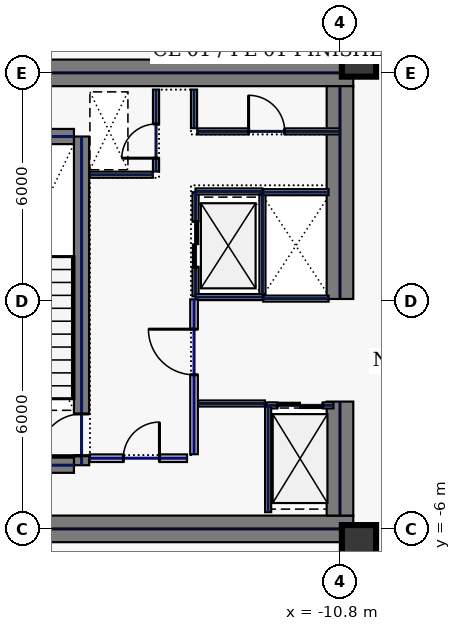
"""IFC4 building model, lengths in metres.
Left out: names, types, materials, properties, quantities, classifications, styles, units other than length and angle.
Written with IfcOpenShell. Run it as: python <this file> out.ifc"""

import sys

from ifc_helpers import new_model, si_unit, direction, frame, frame_2d, origin, origin_2d, place, context, subcontext, project, spatial, rectangle, hollow_rectangle, extrude, element, fill, save


model = new_model("IFC4")
c1 = context("Model", 3, precision=1e-05, world=origin(), true_north=direction((0.0, 1.0)))
c2 = subcontext(c1, "Body", "Model", "MODEL_VIEW")
j1 = project(units=[si_unit("LENGTHUNIT", "METRE"), si_unit("PLANEANGLEUNIT", "RADIAN")], contexts=[c1])
p1 = place(None, origin())
s1 = spatial("IfcSite", under=j1, at=p1, CompositionType="ELEMENT")
p2 = place(p1, origin())
s2 = spatial("IfcBuilding", under=s1, at=p2, CompositionType="ELEMENT")
p3 = place(p2, frame((0.0, 0.0, 184.2)))
s3 = spatial("IfcBuildingStorey", under=s2, at=p3, CompositionType="ELEMENT", Elevation=184.2)
for number, where, z_axis, x_axis in (
    (1, (-22.0, 6.0, 0.0), (0.0, 0.0, 1.0), (1.0, 0.0, 0.0)),
    (2, (-22.0, -6.0, 0.0), (0.0, 0.0, 1.0), (1.0, 0.0, 0.0)),
):
    element("IfcWall", number, at=place(p3, frame(where, z_axis=z_axis, x_axis=x_axis)), inside=s3, PredefinedType="SHEAR", context=c2, shape_type="SweptSolid", body=[
        extrude(rectangle(XDim=11.55, YDim=0.7, at=frame_2d((5.775, 0.0))), origin(), (0.0, 0.0, 1.0), 3.74),
    ])
p4 = place(p3, frame((-10.8, -5.65, 0.0), z_axis=(0.0, 0.0, 1.0), x_axis=(0.0, 1.0, 0.0)))
e3 = element("IfcWall", 3, at=p4, inside=s3, PredefinedType="SHEAR", context=c2, shape_type="SweptSolid", body=[
    extrude(rectangle(XDim=3.0, YDim=0.7, at=frame_2d((1.5, 0.0))), origin(), (0.0, 0.0, 1.0), 3.74),
])
p5 = place(p3, frame((-10.8, 0.05, 0.0), z_axis=(0.0, 0.0, 1.0), x_axis=(0.0, 1.0, 0.0)))
e4 = element("IfcWall", 4, at=p5, inside=s3, PredefinedType="SHEAR", context=c2, shape_type="SweptSolid", body=[
    extrude(rectangle(XDim=5.6, YDim=0.7, at=frame_2d((2.8, 0.0))), origin(), (0.0, 0.0, 1.0), 3.74),
])
p6 = place(p3, frame((-17.6, -4.325, 0.0), z_axis=(0.0, 0.0, 1.0), x_axis=(0.0, 1.0, 0.0)))
e5 = element("IfcWall", 5, at=p6, inside=s3, PredefinedType="SHEAR", context=c2, shape_type="SweptSolid", body=[
    extrude(rectangle(XDim=8.65, YDim=0.4, at=frame_2d((4.325, 0.0))), origin(), (0.0, 0.0, 1.0), 3.74),
])
p7 = place(p6, frame((0.25, 0.0, 0.0)))
e6 = element("IfcOpeningElement", 6, at=p7, cuts=e5, PredefinedType="OPENING", context=c2, shape_type="SweptSolid", body=[
    extrude(rectangle(XDim=1.1, YDim=2.2, at=frame_2d((0.55, 1.1))), frame((0.0, 0.21, 0.0), z_axis=(0.0, -1.0, 0.0), x_axis=(1.0, 0.0, 0.0)), (0.0, 0.0, 1.0), 0.42),
])
for number, where, z_axis, x_axis in (
    (7, (-21.2, -4.325, 0.0), (0.0, 0.0, 1.0), (1.0, 0.0, 0.0)),
    (8, (-21.2, 4.325, 0.0), (0.0, 0.0, 1.0), (1.0, 0.0, 0.0)),
):
    element("IfcWall", number, at=place(p3, frame(where, z_axis=z_axis, x_axis=x_axis)), inside=s3, PredefinedType="SHEAR", context=c2, shape_type="SweptSolid", body=[
        extrude(rectangle(XDim=3.4, YDim=0.4, at=frame_2d((1.7, 0.0))), origin(), (0.0, 0.0, 1.0), 3.74),
    ])
for number, where, z_axis, x_axis in (
    (9, (-10.3, -6.35, 0.0), (0.0, 0.0, 1.0), (1.0, 0.0, 0.0)),
    (10, (-10.3, 6.35, 0.0), (0.0, 0.0, 1.0), (1.0, 0.0, 0.0)),
):
    element("IfcColumn", number, at=place(p3, frame(where, z_axis=z_axis, x_axis=x_axis)), inside=s3, PredefinedType="COLUMN", context=c2, shape_type="SweptSolid", body=[
        extrude(hollow_rectangle(XDim=0.9, YDim=0.9, WallThickness=0.04, at=origin_2d()), origin(), (0.0, 0.0, 1.0), 3.74),
    ])
p8 = place(p3, frame((-14.6, 0.12, 0.0), z_axis=(0.0, 0.0, 1.0), x_axis=(0.0, 1.0, 0.0)))
e11 = element("IfcWall", 11, at=p8, inside=s3, PredefinedType="PARTITIONING", context=c2, shape_type="SweptSolid", body=[
    extrude(rectangle(XDim=2.74, YDim=0.16, at=frame_2d((1.37, 0.0))), origin(), (0.0, 0.0, 1.0), 3.74),
])
p9 = place(p8, frame((0.77, 0.0, 0.0)))
e12 = element("IfcOpeningElement", 12, at=p9, cuts=e11, PredefinedType="OPENING", context=c2, shape_type="SweptSolid", body=[
    extrude(rectangle(XDim=1.2, YDim=2.2, at=frame_2d((0.6, 1.1))), frame((0.0, 0.09, 0.0), z_axis=(0.0, -1.0, 0.0), x_axis=(1.0, 0.0, 0.0)), (0.0, 0.0, 1.0), 0.18),
])
for number, where, z_axis, x_axis in (
    (13, (-14.6, 0.1, 0.0), (0.0, 0.0, 1.0), (1.0, 0.0, 0.0)),
    (14, (-14.6, 2.88, 0.0), (0.0, 0.0, 1.0), (1.0, 0.0, 0.0)),
):
    element("IfcWall", number, at=place(p3, frame(where, z_axis=z_axis, x_axis=x_axis)), inside=s3, PredefinedType="PARTITIONING", context=c2, shape_type="SweptSolid", body=[
        extrude(rectangle(XDim=1.76, YDim=0.16, at=frame_2d((0.88, 0.0))), origin(), (0.0, 0.0, 1.0), 3.74),
    ])
p10 = place(p3, frame((-12.84, 0.18, 0.0), z_axis=(0.0, 0.0, 1.0), x_axis=(0.0, 1.0, 0.0)))
e15 = element("IfcWall", 15, at=p10, inside=s3, PredefinedType="PARTITIONING", context=c2, shape_type="SweptSolid", body=[
    extrude(rectangle(XDim=2.62, YDim=0.16, at=frame_2d((1.31, 0.0))), origin(), (0.0, 0.0, 1.0), 3.74),
])
p11 = place(p3, frame((-12.73, -2.75, 0.0), z_axis=(0.0, 0.0, 1.0), x_axis=(1.0, 0.0, 0.0)))
e16 = element("IfcWall", 16, at=p11, inside=s3, PredefinedType="PARTITIONING", context=c2, shape_type="SweptSolid", body=[
    extrude(rectangle(XDim=1.76, YDim=0.16, at=frame_2d((0.88, 0.0))), origin(), (0.0, 0.0, 1.0), 3.74),
])
p12 = place(p11, frame((0.28, 0.0, 0.0)))
e17 = element("IfcOpeningElement", 17, at=p12, cuts=e16, PredefinedType="OPENING", context=c2, shape_type="SweptSolid", body=[
    extrude(rectangle(XDim=1.2, YDim=2.2, at=frame_2d((0.6, 1.1))), frame((0.0, 0.09, 0.0), z_axis=(0.0, -1.0, 0.0), x_axis=(1.0, 0.0, 0.0)), (0.0, 0.0, 1.0), 0.18),
])
for number, where, z_axis, x_axis in (
    (18, (-12.82, 0.06, 0.0), (0.0, 0.0, 1.0), (1.0, 0.0, 0.0)),
    (19, (-12.82, 2.86, 0.0), (0.0, 0.0, 1.0), (1.0, 0.0, 0.0)),
):
    element("IfcWall", number, at=place(p3, frame(where, z_axis=z_axis, x_axis=x_axis)), inside=s3, PredefinedType="PARTITIONING", context=c2, shape_type="SweptSolid", body=[
        extrude(rectangle(XDim=1.72, YDim=0.16, at=frame_2d((0.86, 0.0))), origin(), (0.0, 0.0, 1.0), 3.74),
    ])
p13 = place(p3, frame((-15.64, 3.405, 0.0), z_axis=(0.0, 0.0, 1.0), x_axis=(0.0, 1.0, 0.0)))
e20 = element("IfcWall", 20, at=p13, inside=s3, PredefinedType="PARTITIONING", context=c2, shape_type="SweptSolid", body=[
    extrude(rectangle(XDim=2.155, YDim=0.16, at=frame_2d((1.078, 0.0))), origin(), (0.0, 0.0, 1.0), 3.74),
])
p14 = place(p13, frame((0.35, 0.0, 0.0)))
e21 = element("IfcOpeningElement", 21, at=p14, cuts=e20, PredefinedType="OPENING", context=c2, shape_type="SweptSolid", body=[
    extrude(rectangle(XDim=0.9, YDim=2.2, at=frame_2d((0.45, 1.1))), frame((0.0, 0.09, 0.0), z_axis=(0.0, -1.0, 0.0), x_axis=(1.0, 0.0, 0.0)), (0.0, 0.0, 1.0), 0.18),
])
p15 = place(p3, frame((-17.38, 3.32, 0.0), z_axis=(0.0, 0.0, 1.0), x_axis=(1.0, 0.0, 0.0)))
e22 = element("IfcWall", 22, at=p15, inside=s3, PredefinedType="PARTITIONING", context=c2, shape_type="SweptSolid", body=[
    extrude(rectangle(XDim=1.655, YDim=0.16, at=frame_2d((0.827, 0.0))), origin(), (0.0, 0.0, 1.0), 3.74),
])
p16 = place(p3, frame((-17.38, -4.14, 0.0), z_axis=(0.0, 0.0, 1.0), x_axis=(1.0, 0.0, 0.0)))
e23 = element("IfcWall", 23, at=p16, inside=s3, PredefinedType="SOLIDWALL", context=c2, shape_type="SweptSolid", body=[
    extrude(rectangle(XDim=2.555, YDim=0.2, at=frame_2d((1.277, 0.0))), origin(), (0.0, 0.0, 1.0), 3.74),
])
p17 = place(p16, frame((0.88, 0.0, 0.0)))
e24 = element("IfcOpeningElement", 24, at=p17, cuts=e23, PredefinedType="OPENING", context=c2, shape_type="SweptSolid", body=[
    extrude(rectangle(XDim=0.95, YDim=2.2, at=frame_2d((0.475, 1.1))), frame((0.0, 0.11, 0.0), z_axis=(0.0, -1.0, 0.0), x_axis=(1.0, 0.0, 0.0)), (0.0, 0.0, 1.0), 0.22),
])
p18 = place(p3, frame((-14.535, -2.7, 0.0), z_axis=(0.0, 0.0, 1.0), x_axis=(1.0, 0.0, 0.0)))
e25 = element("IfcWall", 25, at=p18, inside=s3, PredefinedType="PARTITIONING", context=c2, shape_type="SweptSolid", body=[
    extrude(rectangle(XDim=1.76, YDim=0.16, at=frame_2d((0.88, 0.0))), origin(), (0.0, 0.0, 1.0), 3.74),
])
p19 = place(p3, frame((-12.69, -5.56, 0.0), z_axis=(0.0, 0.0, 1.0), x_axis=(0.0, 1.0, 0.0)))
e26 = element("IfcWall", 26, at=p19, inside=s3, PredefinedType="PARTITIONING", context=c2, shape_type="SweptSolid", body=[
    extrude(rectangle(XDim=2.775, YDim=0.16, at=frame_2d((1.388, 0.0))), origin(), (0.0, 0.0, 1.0), 3.74),
])
p20 = place(p3, frame((-14.555, 4.46, 0.0), z_axis=(0.0, 0.0, 1.0), x_axis=(1.0, 0.0, 0.0)))
e27 = element("IfcWall", 27, at=p20, inside=s3, PredefinedType="PARTITIONING", context=c2, shape_type="SweptSolid", body=[
    extrude(rectangle(XDim=3.755, YDim=0.16, at=frame_2d((1.877, 0.0))), origin(), (0.0, 0.0, 1.0), 3.74),
])
p21 = place(p20, frame((1.35, 0.0, 0.0)))
e28 = element("IfcOpeningElement", 28, at=p21, cuts=e27, PredefinedType="OPENING", context=c2, shape_type="SweptSolid", body=[
    extrude(rectangle(XDim=0.95, YDim=2.2, at=frame_2d((0.475, 1.1))), frame((0.0, 0.09, 0.0), z_axis=(0.0, -1.0, 0.0), x_axis=(1.0, 0.0, 0.0)), (0.0, 0.0, 1.0), 0.18),
])
p22 = place(p3, frame((-14.64, 4.545, 0.0), z_axis=(0.0, 0.0, 1.0), x_axis=(0.0, 1.0, 0.0)))
e29 = element("IfcWall", 29, at=p22, inside=s3, PredefinedType="PARTITIONING", context=c2, shape_type="SweptSolid", body=[
    extrude(rectangle(XDim=1.015, YDim=0.16, at=frame_2d((0.508, 0.0))), origin(), (0.0, 0.0, 1.0), 3.74),
])
p23 = place(p3, frame((-14.64, -4.035, 0.0), z_axis=(0.0, 0.0, 1.0), x_axis=(0.0, 1.0, 0.0)))
e30 = element("IfcWall", 30, at=p23, inside=s3, PredefinedType="SOLIDWALL", context=c2, shape_type="SweptSolid", body=[
    extrude(rectangle(XDim=4.075, YDim=0.2, at=frame_2d((2.038, 0.0))), origin(), (0.0, 0.0, 1.0), 3.74),
])
p24 = place(p23, frame((2.09, 0.0, 0.0)))
e31 = element("IfcOpeningElement", 31, at=p24, cuts=e30, PredefinedType="OPENING", context=c2, shape_type="SweptSolid", body=[
    extrude(rectangle(XDim=1.2, YDim=2.2, at=frame_2d((0.6, 1.1))), frame((0.0, 0.11, 0.0), z_axis=(0.0, -1.0, 0.0), x_axis=(1.0, 0.0, 0.0)), (0.0, 0.0, 1.0), 0.22),
])
p25 = place(p3, frame((-10.63, -7.335, 0.0), z_axis=(0.0, 0.0, 1.0), x_axis=(0.0, 1.0, 0.0)))
e32 = element("IfcWall", 32, at=p25, inside=s3, PredefinedType="PARTITIONING", context=c2, shape_type="SweptSolid", body=[
    extrude(rectangle(XDim=0.915, YDim=0.16, at=frame_2d((0.458, 0.0))), origin(), (0.0, 0.0, 1.0), 3.74),
])
p26 = place(p3, frame((-10.63, 6.42, 0.0), z_axis=(0.0, 0.0, 1.0), x_axis=(0.0, 1.0, 0.0)))
e33 = element("IfcWall", 33, at=p26, inside=s3, PredefinedType="PARTITIONING", context=c2, shape_type="SweptSolid", body=[
    extrude(rectangle(XDim=1.015, YDim=0.16, at=frame_2d((0.508, 0.0))), origin(), (0.0, 0.0, 1.0), 3.74),
])
p27 = place(p7, origin())
e34 = element("IfcDoor", 34, at=p27, inside=s3, OperationType="SINGLE_SWING_LEFT", PredefinedType="DOOR", context=c2, shape_type="SweptSolid", body=[
    extrude(rectangle(XDim=1.1, YDim=2.2, at=frame_2d((0.55, 1.1))), frame((0.0, 0.025, 0.0), z_axis=(0.0, -1.0, 0.0), x_axis=(1.0, 0.0, 0.0)), (0.0, 0.0, 1.0), 0.05),
])
fill(e6, e34)
p28 = place(p9, origin())
e35 = element("IfcDoor", 35, at=p28, inside=s3, OperationType="SLIDING_TO_LEFT", PredefinedType="DOOR", context=c2, shape_type="SweptSolid", body=[
    extrude(rectangle(XDim=1.2, YDim=2.2, at=frame_2d((0.6, 1.1))), frame((0.0, 0.025, 0.0), z_axis=(0.0, -1.0, 0.0), x_axis=(1.0, 0.0, 0.0)), (0.0, 0.0, 1.0), 0.05),
])
fill(e12, e35)
p29 = place(p12, origin())
e36 = element("IfcDoor", 36, at=p29, inside=s3, OperationType="SLIDING_TO_LEFT", PredefinedType="DOOR", context=c2, shape_type="SweptSolid", body=[
    extrude(rectangle(XDim=1.2, YDim=2.2, at=frame_2d((0.6, 1.1))), frame((0.0, 0.025, 0.0), z_axis=(0.0, -1.0, 0.0), x_axis=(1.0, 0.0, 0.0)), (0.0, 0.0, 1.0), 0.05),
])
fill(e17, e36)
p30 = place(p14, origin())
e37 = element("IfcDoor", 37, at=p30, inside=s3, OperationType="SINGLE_SWING_LEFT", PredefinedType="DOOR", context=c2, shape_type="SweptSolid", body=[
    extrude(rectangle(XDim=0.9, YDim=2.2, at=frame_2d((0.45, 1.1))), frame((0.0, 0.025, 0.0), z_axis=(0.0, -1.0, 0.0), x_axis=(1.0, 0.0, 0.0)), (0.0, 0.0, 1.0), 0.05),
])
fill(e21, e37)
p31 = place(p17, origin())
e38 = element("IfcDoor", 38, at=p31, inside=s3, OperationType="SINGLE_SWING_RIGHT", PredefinedType="DOOR", context=c2, shape_type="SweptSolid", body=[
    extrude(rectangle(XDim=0.95, YDim=2.2, at=frame_2d((0.475, 1.1))), frame((0.0, 0.025, 0.0), z_axis=(0.0, -1.0, 0.0), x_axis=(1.0, 0.0, 0.0)), (0.0, 0.0, 1.0), 0.05),
])
fill(e24, e38)
p32 = place(p21, origin())
e39 = element("IfcDoor", 39, at=p32, inside=s3, OperationType="SINGLE_SWING_LEFT", PredefinedType="DOOR", context=c2, shape_type="SweptSolid", body=[
    extrude(rectangle(XDim=0.95, YDim=2.2, at=frame_2d((0.475, 1.1))), frame((0.0, 0.025, 0.0), z_axis=(0.0, -1.0, 0.0), x_axis=(1.0, 0.0, 0.0)), (0.0, 0.0, 1.0), 0.05),
])
fill(e28, e39)
p33 = place(p24, origin())
e40 = element("IfcDoor", 40, at=p33, inside=s3, OperationType="SINGLE_SWING_RIGHT", PredefinedType="DOOR", context=c2, shape_type="SweptSolid", body=[
    extrude(rectangle(XDim=1.2, YDim=2.2, at=frame_2d((0.6, 1.1))), frame((0.0, 0.025, 0.0), z_axis=(0.0, -1.0, 0.0), x_axis=(1.0, 0.0, 0.0)), (0.0, 0.0, 1.0), 0.05),
])
fill(e31, e40)
save(model, sys.argv[1])
